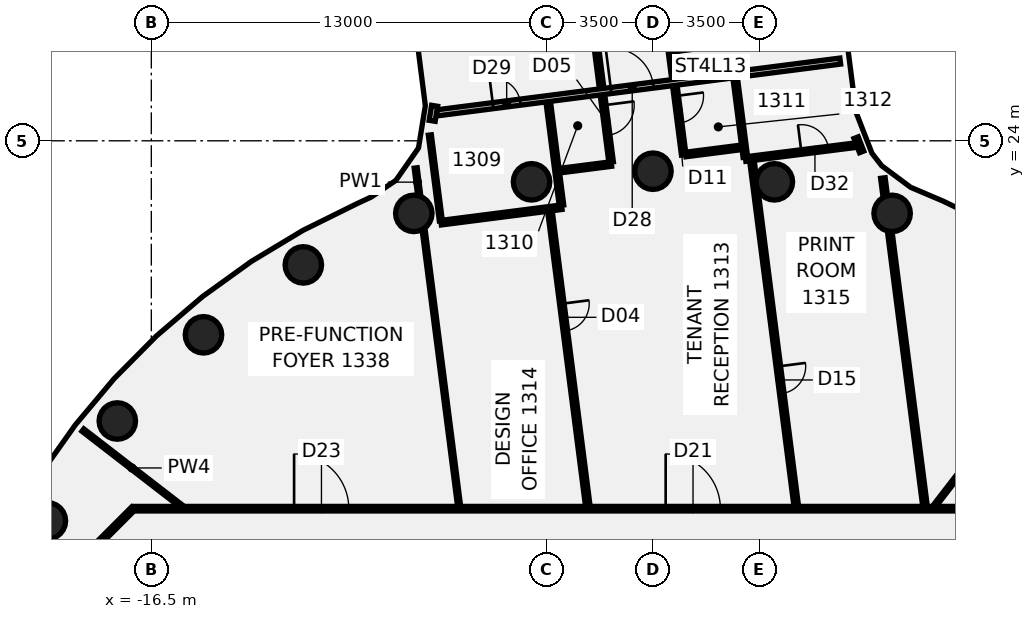
"""IFC4 building model, lengths in metres.
Left out: names, types, materials, properties, quantities, classifications, styles, units other than length and angle.
Written with IfcOpenShell. Run it as: python <this file> out.ifc"""

import sys

from ifc_helpers import new_model, si_unit, direction, frame, frame_2d, origin, origin_2d, place, context, subcontext, project, spatial, rectangle, circle, extrude, element, fill, save


model = new_model("IFC4")
c1 = context("Model", 3, precision=1e-05, world=origin(), true_north=direction((0.0, 1.0)))
c2 = subcontext(c1, "Body", "Model", "MODEL_VIEW")
j1 = project(units=[si_unit("LENGTHUNIT", "METRE"), si_unit("PLANEANGLEUNIT", "RADIAN")], contexts=[c1])
p1 = place(None, origin())
s1 = spatial("IfcSite", under=j1, at=p1, CompositionType="ELEMENT")
p2 = place(p1, origin())
s2 = spatial("IfcBuilding", under=s1, at=p2, CompositionType="ELEMENT")
p3 = place(p2, frame((0.0, 0.0, 60.25)))
s3 = spatial("IfcBuildingStorey", under=s2, at=p3, CompositionType="ELEMENT", Elevation=60.25)
for number, where, z_axis, x_axis in (
    (1, (7.866, 21.613, -0.14), (0.0, 0.0, 1.0), (1.0, 0.0, 0.0)),
    (2, (3.994, 22.651, -0.14), (0.0, 0.0, 1.0), (1.0, 0.0, 0.0)),
    (3, (0.0, 23.0, -0.14), (0.0, 0.0, 1.0), (1.0, 0.0, 0.0)),
    (4, (-3.994, 22.651, -0.14), (0.0, 0.0, 1.0), (1.0, 0.0, 0.0)),
    (5, (-7.866, 21.613, -0.14), (0.0, 0.0, 1.0), (1.0, 0.0, 0.0)),
    (6, (-11.5, 19.919, -0.14), (0.0, 0.0, 1.0), (1.0, 0.0, 0.0)),
    (7, (-14.784, 17.619, -0.14), (0.0, 0.0, 1.0), (1.0, 0.0, 0.0)),
    (8, (-17.619, 14.784, -0.14), (0.0, 0.0, 1.0), (1.0, 0.0, 0.0)),
    (9, (-19.919, 11.5, -0.14), (0.0, 0.0, 1.0), (1.0, 0.0, 0.0)),
):
    element("IfcColumn", number, at=place(p3, frame(where, z_axis=z_axis, x_axis=x_axis)), inside=s3, PredefinedType="COLUMN", context=c2, shape_type="SweptSolid", body=[
        extrude(circle(Radius=0.6, at=origin_2d()), origin(), (0.0, 0.0, 1.0), 3.75),
    ])
p4 = place(p3, frame((-7.804, 23.106, 0.0), z_axis=(0.0, 0.0, 1.0), x_axis=(0.127295384389, -0.991864852242, 0.0)))
e10 = element("IfcWall", 10, at=p4, inside=s3, PredefinedType="PARTITIONING", context=c2, shape_type="SweptSolid", body=[
    extrude(rectangle(XDim=0.94, YDim=0.1, at=frame_2d((0.47, 0.0))), origin(), (0.0, 0.0, 1.0), 3.01),
])
p5 = place(p3, frame((-7.546, 21.1, 0.0), z_axis=(0.0, 0.0, 1.0), x_axis=(0.127267297213, -0.991868456531, 0.0)))
e11 = element("IfcWall", 11, at=p5, inside=s3, PredefinedType="PARTITIONING", context=c2, shape_type="SweptSolid", body=[
    extrude(rectangle(XDim=9.21, YDim=0.1, at=frame_2d((4.605, 0.0))), origin(), (0.0, 0.0, 1.0), 3.01),
])
p6 = place(p3, frame((-7.339, 24.191, 0.0), z_axis=(0.0, 0.0, 1.0), x_axis=(0.127216321892, -0.991874995876, 0.0)))
e12 = element("IfcWall", 12, at=p6, inside=s3, PredefinedType="PARTITIONING", context=c2, shape_type="SweptSolid", body=[
    extrude(rectangle(XDim=2.842, YDim=0.1, at=frame_2d((1.421, 0.0))), origin(), (0.0, 0.0, 1.0), 3.01),
])
p7 = place(p3, frame((-3.446, 25.288, 0.0), z_axis=(0.0, 0.0, 1.0), x_axis=(0.127218102171, -0.991874767539, 0.0)))
e13 = element("IfcWall", 13, at=p7, inside=s3, PredefinedType="PARTITIONING", context=c2, shape_type="SweptSolid", body=[
    extrude(rectangle(XDim=3.435, YDim=0.15, at=frame_2d((1.718, 0.0))), origin(), (0.0, 0.0, 1.0), 3.01),
])
p8 = place(p3, frame((-3.388, 21.691, 0.0), z_axis=(0.0, 0.0, 1.0), x_axis=(0.127289992737, -0.991865544189, 0.0)))
e14 = element("IfcWall", 14, at=p8, inside=s3, PredefinedType="PARTITIONING", context=c2, shape_type="SweptSolid", body=[
    extrude(rectangle(XDim=9.801, YDim=0.15, at=frame_2d((4.9, 0.0))), origin(), (0.0, 0.0, 1.0), 3.01),
])
p9 = place(p8, frame((3.075, 0.0, 0.0)))
e15 = element("IfcOpeningElement", 15, at=p9, cuts=e14, PredefinedType="OPENING", context=c2, shape_type="SweptSolid", body=[
    extrude(rectangle(XDim=0.9, YDim=2.1, at=frame_2d((0.45, 1.05))), frame((0.0, 0.085, 0.0), z_axis=(0.0, -1.0, 0.0), x_axis=(1.0, 0.0, 0.0)), (0.0, 0.0, 1.0), 0.17),
])
p10 = place(p3, frame((-3.383, 38.932, 0.0), z_axis=(0.0, 0.0, 1.0), x_axis=(0.127324931281, -0.991861059763, 0.0)))
e16 = element("IfcWall", 16, at=p10, inside=s3, PredefinedType="PARTITIONING", context=c2, shape_type="SweptSolid", body=[
    extrude(rectangle(XDim=15.76, YDim=0.15, at=frame_2d((7.88, 0.0))), origin(), (0.0, 0.0, 1.0), 3.01),
])
p11 = place(p10, frame((13.875, 0.0, 0.0)))
e17 = element("IfcOpeningElement", 17, at=p11, cuts=e16, PredefinedType="OPENING", context=c2, shape_type="SweptSolid", body=[
    extrude(rectangle(XDim=1.0, YDim=2.1, at=frame_2d((0.5, 1.05))), frame((0.0, 0.085, 0.0), z_axis=(0.0, -1.0, 0.0), x_axis=(1.0, 0.0, 0.0)), (0.0, 0.0, 1.0), 0.17),
])
p12 = place(p10, frame((6.825, 0.0, 0.0)))
e18 = element("IfcOpeningElement", 18, at=p12, cuts=e16, PredefinedType="OPENING", context=c2, shape_type="SweptSolid", body=[
    extrude(rectangle(XDim=0.9, YDim=2.1, at=frame_2d((0.45, 1.05))), frame((0.0, 0.085, 0.0), z_axis=(0.0, -1.0, 0.0), x_axis=(1.0, 0.0, 0.0)), (0.0, 0.0, 1.0), 0.17),
])
p13 = place(p10, frame((1.275, 0.0, 0.0)))
e19 = element("IfcOpeningElement", 19, at=p13, cuts=e16, PredefinedType="OPENING", context=c2, shape_type="SweptSolid", body=[
    extrude(rectangle(XDim=0.9, YDim=2.1, at=frame_2d((0.45, 1.05))), frame((0.0, 0.085, 0.0), z_axis=(0.0, -1.0, 0.0), x_axis=(1.0, 0.0, 0.0)), (0.0, 0.0, 1.0), 0.17),
])
p14 = place(p10, frame((9.824, 0.0, 0.0)))
e20 = element("IfcOpeningElement", 20, at=p14, cuts=e16, PredefinedType="OPENING", context=c2, shape_type="SweptSolid", body=[
    extrude(rectangle(XDim=1.8, YDim=2.1, at=frame_2d((0.9, 1.05))), frame((0.0, 0.085, 0.0), z_axis=(0.0, -1.0, 0.0), x_axis=(1.0, 0.0, 0.0)), (0.0, 0.0, 1.0), 0.17),
])
p15 = place(p3, frame((0.584, 26.875, 0.0), z_axis=(0.0, 0.0, 1.0), x_axis=(0.127270601511, -0.991868032548, 0.0)))
e21 = element("IfcWall", 21, at=p15, inside=s3, PredefinedType="PARTITIONING", context=c2, shape_type="SweptSolid", body=[
    extrude(rectangle(XDim=3.361, YDim=0.15, at=frame_2d((1.68, 0.0))), origin(), (0.0, 0.0, 1.0), 3.01),
])
p16 = place(p15, frame((1.41, 0.0, 0.0)))
e22 = element("IfcOpeningElement", 22, at=p16, cuts=e21, PredefinedType="OPENING", context=c2, shape_type="SweptSolid", body=[
    extrude(rectangle(XDim=0.9, YDim=2.1, at=frame_2d((0.45, 1.05))), frame((0.0, 0.085, 0.0), z_axis=(0.0, -1.0, 0.0), x_axis=(1.0, 0.0, 0.0)), (0.0, 0.0, 1.0), 0.17),
])
p17 = place(p3, frame((2.703, 26.077, 0.0), z_axis=(0.0, 0.0, 1.0), x_axis=(0.127489190564, -0.991839960018, 0.0)))
e23 = element("IfcWall", 23, at=p17, inside=s3, PredefinedType="PARTITIONING", context=c2, shape_type="SweptSolid", body=[
    extrude(rectangle(XDim=2.635, YDim=0.15, at=frame_2d((1.317, 0.0))), origin(), (0.0, 0.0, 1.0), 3.01),
])
p18 = place(p3, frame((3.254, 23.35, 0.0), z_axis=(0.0, 0.0, 1.0), x_axis=(0.12731031991, -0.991862935311, 0.0)))
e24 = element("IfcWall", 24, at=p18, inside=s3, PredefinedType="PARTITIONING", context=c2, shape_type="SweptSolid", body=[
    extrude(rectangle(XDim=11.473, YDim=0.15, at=frame_2d((5.737, 0.0))), origin(), (0.0, 0.0, 1.0), 3.01),
])
p19 = place(p18, frame((6.825, 0.0, 0.0)))
e25 = element("IfcOpeningElement", 25, at=p19, cuts=e24, PredefinedType="OPENING", context=c2, shape_type="SweptSolid", body=[
    extrude(rectangle(XDim=0.9, YDim=2.1, at=frame_2d((0.45, 1.05))), frame((0.0, 0.085, 0.0), z_axis=(0.0, -1.0, 0.0), x_axis=(1.0, 0.0, 0.0)), (0.0, 0.0, 1.0), 0.17),
])
p20 = place(p3, frame((7.563, 22.775, 0.0), z_axis=(0.0, 0.0, 1.0), x_axis=(0.127293958292, -0.991865035266, 0.0)))
e26 = element("IfcWall", 26, at=p20, inside=s3, PredefinedType="PARTITIONING", context=c2, shape_type="SweptSolid", body=[
    extrude(rectangle(XDim=0.618, YDim=0.15, at=frame_2d((0.309, 0.0))), origin(), (0.0, 0.0, 1.0), 3.01),
])
p21 = place(p3, frame((7.788, 21.024, 0.0), z_axis=(0.0, 0.0, 1.0), x_axis=(0.127302620223, -0.991863923572, 0.0)))
e27 = element("IfcWall", 27, at=p21, inside=s3, PredefinedType="PARTITIONING", context=c2, shape_type="SweptSolid", body=[
    extrude(rectangle(XDim=9.129, YDim=0.15, at=frame_2d((4.564, 0.0))), origin(), (0.0, 0.0, 1.0), 3.01),
])
p22 = place(p3, frame((-18.751, 14.485, 0.0), z_axis=(0.0, 0.0, 1.0), x_axis=(0.791390423198, -0.611311048542, 0.0)))
e28 = element("IfcWall", 28, at=p22, inside=s3, PredefinedType="PARTITIONING", context=c2, shape_type="SweptSolid", body=[
    extrude(rectangle(XDim=4.074, YDim=0.1, at=frame_2d((2.037, 0.0))), origin(), (0.0, 0.0, 1.0), 3.01),
])
p23 = place(p3, frame((-17.065, 11.9, 0.0), z_axis=(0.0, 0.0, 1.0), x_axis=(1.0, 0.0, 0.0)))
e29 = element("IfcWall", 29, at=p23, inside=s3, PredefinedType="PARTITIONING", context=c2, shape_type="SweptSolid", body=[
    extrude(rectangle(XDim=34.165, YDim=0.15, at=frame_2d((17.083, 0.0))), origin(), (0.0, 0.0, 1.0), 3.01),
])
p24 = place(p23, frame((17.483, 0.0, 0.0)))
e30 = element("IfcOpeningElement", 30, at=p24, cuts=e29, PredefinedType="OPENING", context=c2, shape_type="SweptSolid", body=[
    extrude(rectangle(XDim=1.8, YDim=2.1, at=frame_2d((0.9, 1.05))), frame((0.0, 0.085, 0.0), z_axis=(0.0, -1.0, 0.0), x_axis=(1.0, 0.0, 0.0)), (0.0, 0.0, 1.0), 0.17),
])
p25 = place(p23, frame((30.158, 0.0, 0.0)))
e31 = element("IfcOpeningElement", 31, at=p25, cuts=e29, PredefinedType="OPENING", context=c2, shape_type="SweptSolid", body=[
    extrude(rectangle(XDim=1.8, YDim=2.1, at=frame_2d((0.9, 1.05))), frame((0.0, 0.085, 0.0), z_axis=(0.0, -1.0, 0.0), x_axis=(1.0, 0.0, 0.0)), (0.0, 0.0, 1.0), 0.17),
])
p26 = place(p23, frame((5.261, 0.0, 0.0)))
e32 = element("IfcOpeningElement", 32, at=p26, cuts=e29, PredefinedType="OPENING", context=c2, shape_type="SweptSolid", body=[
    extrude(rectangle(XDim=1.8, YDim=2.1, at=frame_2d((0.9, 1.05))), frame((0.0, 0.085, 0.0), z_axis=(0.0, -1.0, 0.0), x_axis=(1.0, 0.0, 0.0)), (0.0, 0.0, 1.0), 0.17),
])
p27 = place(p3, frame((-7.108, 24.919, 0.0), z_axis=(0.0, 0.0, 1.0), x_axis=(0.991868025125, 0.127270659366, 0.0)))
e33 = element("IfcWall", 33, at=p27, inside=s3, PredefinedType="PARTITIONING", context=c2, shape_type="SweptSolid", body=[
    extrude(rectangle(XDim=13.378, YDim=0.2, at=frame_2d((6.689, 0.0))), origin(), (0.0, 0.0, 1.0), 3.01),
])
p28 = place(p27, frame((5.779, 0.0, 0.0)))
e34 = element("IfcOpeningElement", 34, at=p28, cuts=e33, PredefinedType="OPENING", context=c2, shape_type="SweptSolid", body=[
    extrude(rectangle(XDim=1.4, YDim=2.1, at=frame_2d((0.7, 1.05))), frame((0.0, 0.11, 0.0), z_axis=(0.0, -1.0, 0.0), x_axis=(1.0, 0.0, 0.0)), (0.0, 0.0, 1.0), 0.22),
])
p29 = place(p27, frame((1.865, 0.0, 0.0)))
e35 = element("IfcOpeningElement", 35, at=p29, cuts=e33, PredefinedType="OPENING", context=c2, shape_type="SweptSolid", body=[
    extrude(rectangle(XDim=0.9, YDim=2.1, at=frame_2d((0.45, 1.05))), frame((0.0, 0.11, 0.0), z_axis=(0.0, -1.0, 0.0), x_axis=(1.0, 0.0, 0.0)), (0.0, 0.0, 1.0), 0.22),
])
p30 = place(p3, frame((-6.969, 21.307, 0.0), z_axis=(0.0, 0.0, 1.0), x_axis=(0.991871793168, 0.127241290147, 0.0)))
e36 = element("IfcWall", 36, at=p30, inside=s3, PredefinedType="PARTITIONING", context=c2, shape_type="SweptSolid", body=[
    extrude(rectangle(XDim=4.0, YDim=0.15, at=frame_2d((2.0, 0.0))), origin(), (0.0, 0.0, 1.0), 3.01),
])
p31 = place(p3, frame((-3.08, 23.017, 0.0), z_axis=(0.0, 0.0, 1.0), x_axis=(0.991878919151, 0.127185729328, 0.0)))
e37 = element("IfcWall", 37, at=p31, inside=s3, PredefinedType="PARTITIONING", context=c2, shape_type="SweptSolid", body=[
    extrude(rectangle(XDim=1.726, YDim=0.15, at=frame_2d((0.863, 0.0))), origin(), (0.0, 0.0, 1.0), 3.01),
])
p32 = place(p3, frame((1.076, 23.549, 0.0), z_axis=(0.0, 0.0, 1.0), x_axis=(0.991881240243, 0.127167626594, 0.0)))
e38 = element("IfcWall", 38, at=p32, inside=s3, PredefinedType="PARTITIONING", context=c2, shape_type="SweptSolid", body=[
    extrude(rectangle(XDim=1.86, YDim=0.15, at=frame_2d((0.93, 0.0))), origin(), (0.0, 0.0, 1.0), 3.01),
])
p33 = place(p3, frame((3.047, 23.399, 0.0), z_axis=(0.0, 0.0, 1.0), x_axis=(0.992116377625, 0.125319963489, 0.0)))
e39 = element("IfcWall", 39, at=p33, inside=s3, PredefinedType="PARTITIONING", context=c2, shape_type="SweptSolid", body=[
    extrude(rectangle(XDim=3.67, YDim=0.15, at=frame_2d((1.835, 0.0))), origin(), (0.0, 0.0, 1.0), 3.01),
])
p34 = place(p33, frame((1.85, 0.0, 0.0)))
e40 = element("IfcOpeningElement", 40, at=p34, cuts=e39, PredefinedType="OPENING", context=c2, shape_type="SweptSolid", body=[
    extrude(rectangle(XDim=0.9, YDim=2.1, at=frame_2d((0.45, 1.05))), frame((0.0, 0.085, 0.0), z_axis=(0.0, -1.0, 0.0), x_axis=(1.0, 0.0, 0.0)), (0.0, 0.0, 1.0), 0.17),
])
p35 = place(p3, frame((-18.872, 10.128, 0.0), z_axis=(0.0, 0.0, 1.0), x_axis=(0.707106781187, 0.707106781187, 0.0)))
e41 = element("IfcWall", 41, at=p35, inside=s3, PredefinedType="PARTITIONING", context=c2, shape_type="SweptSolid", body=[
    extrude(rectangle(XDim=2.505, YDim=0.15, at=frame_2d((1.253, 0.0))), origin(), (0.0, 0.0, 1.0), 3.01),
])
p36 = place(p3, frame((9.26, 11.988, 0.0), z_axis=(0.0, 0.0, 1.0), x_axis=(0.611328797993, 0.791376712284, 0.0)))
e42 = element("IfcWall", 42, at=p36, inside=s3, PredefinedType="PARTITIONING", context=c2, shape_type="SweptSolid", body=[
    extrude(rectangle(XDim=8.547, YDim=0.1, at=frame_2d((4.273, 0.0))), origin(), (0.0, 0.0, 1.0), 3.01),
])
p37 = place(p3, frame((-7.182, 25.151, 0.0), z_axis=(0.0, 0.0, 1.0), x_axis=(-0.160122582132, -0.987097137414, 0.0)))
e43 = element("IfcWall", 43, at=p37, inside=s3, PredefinedType="PARTITIONING", context=c2, shape_type="SweptSolid", body=[
    extrude(rectangle(XDim=0.5, YDim=0.2, at=frame_2d((0.25, 0.0))), origin(), (0.0, 0.0, 1.0), 3.01),
])
p38 = place(p3, frame((6.863, 23.636, 0.0), z_axis=(0.0, 0.0, 1.0), x_axis=(-0.362446261155, 0.932004671541, 0.0)))
e44 = element("IfcWall", 44, at=p38, inside=s3, PredefinedType="PARTITIONING", context=c2, shape_type="SweptSolid", body=[
    extrude(rectangle(XDim=0.5, YDim=0.15, at=frame_2d((0.25, 0.0))), origin(), (0.0, 0.0, 1.0), 3.01),
])
p39 = place(p3, frame((0.678, 26.927, -0.14), z_axis=(0.0, 0.0, 1.0), x_axis=(-0.127316904587, 0.991862090115, 0.0)))
e45 = element("IfcWall", 45, at=p39, inside=s3, PredefinedType="SHEAR", context=c2, shape_type="SweptSolid", body=[
    extrude(rectangle(XDim=6.7, YDim=0.2, at=frame_2d((3.35, 0.0))), origin(), (0.0, 0.0, 1.0), 3.15),
])
p40 = place(p39, frame((0.35, 0.0, 0.0)))
e46 = element("IfcOpeningElement", 46, at=p40, cuts=e45, PredefinedType="OPENING", context=c2, shape_type="SweptSolid", body=[
    extrude(rectangle(XDim=1.0, YDim=2.1, at=frame_2d((0.5, 1.05))), frame((0.0, 0.11, 0.0), z_axis=(0.0, -1.0, 0.0), x_axis=(1.0, 0.0, 0.0)), (0.0, 0.0, 1.0), 0.22),
])
p41 = place(p9, frame((0.9, 0.0, 0.0), z_axis=(0.0, 0.0, 1.0), x_axis=(-1.0, 0.0, 0.0)))
e47 = element("IfcDoor", 47, at=p41, inside=s3, OperationType="SINGLE_SWING_LEFT", PredefinedType="DOOR", context=c2, shape_type="SweptSolid", body=[
    extrude(rectangle(XDim=0.9, YDim=2.1, at=frame_2d((0.45, 1.05))), frame((0.0, 0.025, 0.0), z_axis=(0.0, -1.0, 0.0), x_axis=(1.0, 0.0, 0.0)), (0.0, 0.0, 1.0), 0.05),
])
fill(e15, e47)
p42 = place(p11, frame((1.0, 0.0, 0.0), z_axis=(0.0, 0.0, 1.0), x_axis=(-1.0, 0.0, 0.0)))
e48 = element("IfcDoor", 48, at=p42, inside=s3, OperationType="SINGLE_SWING_RIGHT", PredefinedType="DOOR", context=c2, shape_type="SweptSolid", body=[
    extrude(rectangle(XDim=1.0, YDim=2.1, at=frame_2d((0.5, 1.05))), frame((0.0, 0.025, 0.0), z_axis=(0.0, -1.0, 0.0), x_axis=(1.0, 0.0, 0.0)), (0.0, 0.0, 1.0), 0.05),
])
fill(e17, e48)
p43 = place(p16, origin())
e49 = element("IfcDoor", 49, at=p43, inside=s3, OperationType="SINGLE_SWING_LEFT", PredefinedType="DOOR", context=c2, shape_type="SweptSolid", body=[
    extrude(rectangle(XDim=0.9, YDim=2.1, at=frame_2d((0.45, 1.05))), frame((0.0, 0.025, 0.0), z_axis=(0.0, -1.0, 0.0), x_axis=(1.0, 0.0, 0.0)), (0.0, 0.0, 1.0), 0.05),
])
fill(e22, e49)
p44 = place(p19, origin())
e50 = element("IfcDoor", 50, at=p44, inside=s3, OperationType="SINGLE_SWING_LEFT", PredefinedType="DOOR", context=c2, shape_type="SweptSolid", body=[
    extrude(rectangle(XDim=0.9, YDim=2.1, at=frame_2d((0.45, 1.05))), frame((0.0, 0.025, 0.0), z_axis=(0.0, -1.0, 0.0), x_axis=(1.0, 0.0, 0.0)), (0.0, 0.0, 1.0), 0.05),
])
fill(e25, e50)
p45 = place(p24, frame((1.8, 0.0, 0.0), z_axis=(0.0, 0.0, 1.0), x_axis=(-1.0, 0.0, 0.0)))
e51 = element("IfcDoor", 51, at=p45, inside=s3, OperationType="DOUBLE_DOOR_SINGLE_SWING", PredefinedType="DOOR", context=c2, shape_type="SweptSolid", body=[
    extrude(rectangle(XDim=1.8, YDim=2.1, at=frame_2d((0.9, 1.05))), frame((0.0, 0.025, 0.0), z_axis=(0.0, -1.0, 0.0), x_axis=(1.0, 0.0, 0.0)), (0.0, 0.0, 1.0), 0.05),
])
fill(e30, e51)
p46 = place(p26, origin())
e52 = element("IfcDoor", 52, at=p46, inside=s3, OperationType="DOUBLE_DOOR_SINGLE_SWING", PredefinedType="DOOR", context=c2, shape_type="SweptSolid", body=[
    extrude(rectangle(XDim=1.8, YDim=2.1, at=frame_2d((0.9, 1.05))), frame((0.0, 0.025, 0.0), z_axis=(0.0, -1.0, 0.0), x_axis=(1.0, 0.0, 0.0)), (0.0, 0.0, 1.0), 0.05),
])
fill(e32, e52)
p47 = place(p28, frame((1.4, 0.0, 0.0), z_axis=(0.0, 0.0, 1.0), x_axis=(-1.0, 0.0, 0.0)))
e53 = element("IfcDoor", 53, at=p47, inside=s3, OperationType="DOUBLE_DOOR_SINGLE_SWING", PredefinedType="DOOR", context=c2, shape_type="SweptSolid", body=[
    extrude(rectangle(XDim=1.4, YDim=2.1, at=frame_2d((0.7, 1.05))), frame((0.0, 0.025, 0.0), z_axis=(0.0, -1.0, 0.0), x_axis=(1.0, 0.0, 0.0)), (0.0, 0.0, 1.0), 0.05),
])
fill(e34, e53)
p48 = place(p29, frame((0.9, 0.0, 0.0), z_axis=(0.0, 0.0, 1.0), x_axis=(-1.0, 0.0, 0.0)))
e54 = element("IfcDoor", 54, at=p48, inside=s3, OperationType="SINGLE_SWING_LEFT", PredefinedType="DOOR", context=c2, shape_type="SweptSolid", body=[
    extrude(rectangle(XDim=0.9, YDim=2.1, at=frame_2d((0.45, 1.05))), frame((0.0, 0.025, 0.0), z_axis=(0.0, -1.0, 0.0), x_axis=(1.0, 0.0, 0.0)), (0.0, 0.0, 1.0), 0.05),
])
fill(e35, e54)
p49 = place(p34, origin())
e55 = element("IfcDoor", 55, at=p49, inside=s3, OperationType="SINGLE_SWING_LEFT", PredefinedType="DOOR", context=c2, shape_type="SweptSolid", body=[
    extrude(rectangle(XDim=0.9, YDim=2.1, at=frame_2d((0.45, 1.05))), frame((0.0, 0.025, 0.0), z_axis=(0.0, -1.0, 0.0), x_axis=(1.0, 0.0, 0.0)), (0.0, 0.0, 1.0), 0.05),
])
fill(e40, e55)
save(model, sys.argv[1])
